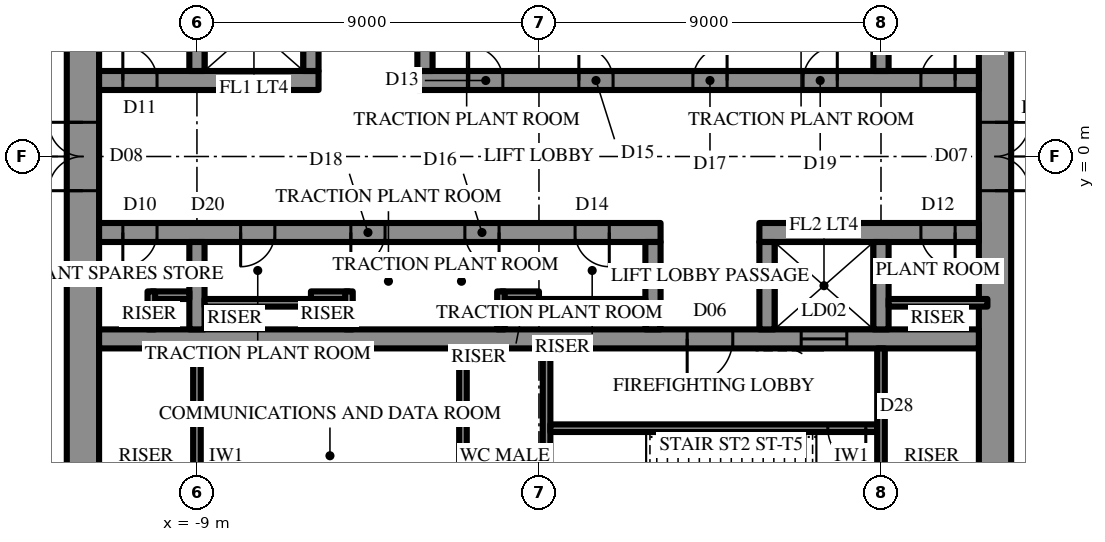
"""IFC4 building model, lengths in metres.
Left out: names, types, materials, properties, quantities, classifications, styles, units other than length and angle.
Written with IfcOpenShell. Run it as: python <this file> out.ifc"""

import sys

from ifc_helpers import new_model, si_unit, direction, frame, frame_2d, origin, place, context, subcontext, project, spatial, rectangle, extrude, element, fill, save


model = new_model("IFC4")
c1 = context("Model", 3, precision=1e-05, world=origin(), true_north=direction((0.0, 1.0)))
c2 = subcontext(c1, "Body", "Model", "MODEL_VIEW")
j1 = project(units=[si_unit("LENGTHUNIT", "METRE"), si_unit("PLANEANGLEUNIT", "RADIAN")], contexts=[c1])
p1 = place(None, origin())
s1 = spatial("IfcSite", under=j1, at=p1, CompositionType="ELEMENT")
p2 = place(p1, origin())
s2 = spatial("IfcBuilding", under=s1, at=p2, CompositionType="ELEMENT")
p3 = place(p2, frame((0.0, 0.0, 396.3)))
s3 = spatial("IfcBuildingStorey", under=s2, at=p3, CompositionType="ELEMENT", Elevation=396.3)
p4 = place(p3, frame((12.0, -10.7, 0.0), z_axis=(0.0, 0.0, 1.0), x_axis=(0.0, 1.0, 0.0)))
e1 = element("IfcWall", 1, at=p4, inside=s3, PredefinedType="SHEAR", context=c2, shape_type="SweptSolid", body=[
    extrude(rectangle(XDim=21.4, YDim=0.85, at=frame_2d((10.7, 0.0))), origin(), (0.0, 0.0, 1.0), 6.0),
])
p5 = place(p4, frame((9.8, 0.0, 0.0)))
e2 = element("IfcOpeningElement", 2, at=p5, cuts=e1, PredefinedType="OPENING", context=c2, shape_type="SweptSolid", body=[
    extrude(rectangle(XDim=1.8, YDim=2.4, at=frame_2d((0.9, 1.2))), frame((0.0, 0.435, 0.0), z_axis=(0.0, -1.0, 0.0), x_axis=(1.0, 0.0, 0.0)), (0.0, 0.0, 1.0), 0.87),
])
p6 = place(p3, frame((-12.0, 10.7, 0.0), z_axis=(0.0, 0.0, 1.0), x_axis=(0.0, -1.0, 0.0)))
e3 = element("IfcWall", 3, at=p6, inside=s3, PredefinedType="SHEAR", context=c2, shape_type="SweptSolid", body=[
    extrude(rectangle(XDim=21.4, YDim=0.85, at=frame_2d((10.7, 0.0))), origin(), (0.0, 0.0, 1.0), 6.0),
])
p7 = place(p6, frame((9.8, 0.0, 0.0)))
e4 = element("IfcOpeningElement", 4, at=p7, cuts=e3, PredefinedType="OPENING", context=c2, shape_type="SweptSolid", body=[
    extrude(rectangle(XDim=1.8, YDim=2.4, at=frame_2d((0.9, 1.2))), frame((0.0, 0.435, 0.0), z_axis=(0.0, -1.0, 0.0), x_axis=(1.0, 0.0, 0.0)), (0.0, 0.0, 1.0), 0.87),
])
p8 = place(p3, frame((-11.575, 2.0, 0.0), z_axis=(0.0, 0.0, 1.0), x_axis=(1.0, 0.0, 0.0)))
e5 = element("IfcWall", 5, at=p8, inside=s3, PredefinedType="SHEAR", context=c2, shape_type="SweptSolid", body=[
    extrude(rectangle(XDim=5.775, YDim=0.5, at=frame_2d((2.887, 0.0))), origin(), (0.0, 0.0, 1.0), 6.0),
])
p9 = place(p8, frame((0.625, 0.0, 0.0)))
e6 = element("IfcOpeningElement", 6, at=p9, cuts=e5, PredefinedType="OPENING", context=c2, shape_type="SweptSolid", body=[
    extrude(rectangle(XDim=0.9, YDim=2.2, at=frame_2d((0.45, 1.1))), frame((0.0, 0.26, 0.0), z_axis=(0.0, -1.0, 0.0), x_axis=(1.0, 0.0, 0.0)), (0.0, 0.0, 1.0), 0.52),
])
p10 = place(p3, frame((-3.2, 2.0, 0.0), z_axis=(0.0, 0.0, 1.0), x_axis=(1.0, 0.0, 0.0)))
e7 = element("IfcWall", 7, at=p10, inside=s3, PredefinedType="SHEAR", context=c2, shape_type="SweptSolid", body=[
    extrude(rectangle(XDim=14.775, YDim=0.5, at=frame_2d((7.387, 0.0))), origin(), (0.0, 0.0, 1.0), 6.0),
])
p11 = place(p10, frame((1.35, 0.0, 0.0)))
e8 = element("IfcOpeningElement", 8, at=p11, cuts=e7, PredefinedType="OPENING", context=c2, shape_type="SweptSolid", body=[
    extrude(rectangle(XDim=0.9, YDim=2.2, at=frame_2d((0.45, 1.1))), frame((0.0, 0.26, 0.0), z_axis=(0.0, -1.0, 0.0), x_axis=(1.0, 0.0, 0.0)), (0.0, 0.0, 1.0), 0.52),
])
p12 = place(p10, frame((4.25, 0.0, 0.0)))
e9 = element("IfcOpeningElement", 9, at=p12, cuts=e7, PredefinedType="OPENING", context=c2, shape_type="SweptSolid", body=[
    extrude(rectangle(XDim=0.9, YDim=2.2, at=frame_2d((0.45, 1.1))), frame((0.0, 0.26, 0.0), z_axis=(0.0, -1.0, 0.0), x_axis=(1.0, 0.0, 0.0)), (0.0, 0.0, 1.0), 0.52),
])
p13 = place(p10, frame((7.25, 0.0, 0.0)))
e10 = element("IfcOpeningElement", 10, at=p13, cuts=e7, PredefinedType="OPENING", context=c2, shape_type="SweptSolid", body=[
    extrude(rectangle(XDim=0.9, YDim=2.2, at=frame_2d((0.45, 1.1))), frame((0.0, 0.26, 0.0), z_axis=(0.0, -1.0, 0.0), x_axis=(1.0, 0.0, 0.0)), (0.0, 0.0, 1.0), 0.52),
])
p14 = place(p10, frame((10.15, 0.0, 0.0)))
e11 = element("IfcOpeningElement", 11, at=p14, cuts=e7, PredefinedType="OPENING", context=c2, shape_type="SweptSolid", body=[
    extrude(rectangle(XDim=0.9, YDim=2.2, at=frame_2d((0.45, 1.1))), frame((0.0, 0.26, 0.0), z_axis=(0.0, -1.0, 0.0), x_axis=(1.0, 0.0, 0.0)), (0.0, 0.0, 1.0), 0.52),
])
p15 = place(p10, frame((13.25, 0.0, 0.0)))
e12 = element("IfcOpeningElement", 12, at=p15, cuts=e7, PredefinedType="OPENING", context=c2, shape_type="SweptSolid", body=[
    extrude(rectangle(XDim=0.9, YDim=2.2, at=frame_2d((0.45, 1.1))), frame((0.0, 0.26, 0.0), z_axis=(0.0, -1.0, 0.0), x_axis=(1.0, 0.0, 0.0)), (0.0, 0.0, 1.0), 0.52),
])
for number, where, z_axis, x_axis in (
    (13, (-9.0, 2.25, 0.0), (0.0, 0.0, 1.0), (0.0, 1.0, 0.0)),
    (14, (-6.0, 2.25, 0.0), (0.0, 0.0, 1.0), (0.0, 1.0, 0.0)),
    (15, (-3.0, 2.25, 0.0), (0.0, 0.0, 1.0), (0.0, 1.0, 0.0)),
    (16, (9.0, 2.25, 0.0), (0.0, 0.0, 1.0), (0.0, 1.0, 0.0)),
):
    element("IfcWall", number, at=place(p3, frame(where, z_axis=z_axis, x_axis=x_axis)), inside=s3, PredefinedType="SHEAR", context=c2, shape_type="SweptSolid", body=[
        extrude(rectangle(XDim=2.3, YDim=0.4, at=frame_2d((1.15, 0.0))), origin(), (0.0, 0.0, 1.0), 6.0),
    ])
p16 = place(p3, frame((11.575, -2.0, 0.0), z_axis=(0.0, 0.0, 1.0), x_axis=(-1.0, 0.0, 0.0)))
e17 = element("IfcWall", 17, at=p16, inside=s3, PredefinedType="SHEAR", context=c2, shape_type="SweptSolid", body=[
    extrude(rectangle(XDim=5.775, YDim=0.5, at=frame_2d((2.887, 0.0))), origin(), (0.0, 0.0, 1.0), 6.0),
])
p17 = place(p16, frame((0.625, 0.0, 0.0)))
e18 = element("IfcOpeningElement", 18, at=p17, cuts=e17, PredefinedType="OPENING", context=c2, shape_type="SweptSolid", body=[
    extrude(rectangle(XDim=0.9, YDim=2.2, at=frame_2d((0.45, 1.1))), frame((0.0, 0.26, 0.0), z_axis=(0.0, -1.0, 0.0), x_axis=(1.0, 0.0, 0.0)), (0.0, 0.0, 1.0), 0.52),
])
p18 = place(p3, frame((3.2, -2.0, 0.0), z_axis=(0.0, 0.0, 1.0), x_axis=(-1.0, 0.0, 0.0)))
e19 = element("IfcWall", 19, at=p18, inside=s3, PredefinedType="SHEAR", context=c2, shape_type="SweptSolid", body=[
    extrude(rectangle(XDim=14.775, YDim=0.5, at=frame_2d((7.387, 0.0))), origin(), (0.0, 0.0, 1.0), 6.0),
])
p19 = place(p18, frame((1.35, 0.0, 0.0)))
e20 = element("IfcOpeningElement", 20, at=p19, cuts=e19, PredefinedType="OPENING", context=c2, shape_type="SweptSolid", body=[
    extrude(rectangle(XDim=0.9, YDim=2.2, at=frame_2d((0.45, 1.1))), frame((0.0, 0.26, 0.0), z_axis=(0.0, -1.0, 0.0), x_axis=(1.0, 0.0, 0.0)), (0.0, 0.0, 1.0), 0.52),
])
p20 = place(p18, frame((4.25, 0.0, 0.0)))
e21 = element("IfcOpeningElement", 21, at=p20, cuts=e19, PredefinedType="OPENING", context=c2, shape_type="SweptSolid", body=[
    extrude(rectangle(XDim=0.9, YDim=2.2, at=frame_2d((0.45, 1.1))), frame((0.0, 0.26, 0.0), z_axis=(0.0, -1.0, 0.0), x_axis=(1.0, 0.0, 0.0)), (0.0, 0.0, 1.0), 0.52),
])
p21 = place(p18, frame((7.25, 0.0, 0.0)))
e22 = element("IfcOpeningElement", 22, at=p21, cuts=e19, PredefinedType="OPENING", context=c2, shape_type="SweptSolid", body=[
    extrude(rectangle(XDim=0.9, YDim=2.2, at=frame_2d((0.45, 1.1))), frame((0.0, 0.26, 0.0), z_axis=(0.0, -1.0, 0.0), x_axis=(1.0, 0.0, 0.0)), (0.0, 0.0, 1.0), 0.52),
])
p22 = place(p18, frame((10.15, 0.0, 0.0)))
e23 = element("IfcOpeningElement", 23, at=p22, cuts=e19, PredefinedType="OPENING", context=c2, shape_type="SweptSolid", body=[
    extrude(rectangle(XDim=0.9, YDim=2.2, at=frame_2d((0.45, 1.1))), frame((0.0, 0.26, 0.0), z_axis=(0.0, -1.0, 0.0), x_axis=(1.0, 0.0, 0.0)), (0.0, 0.0, 1.0), 0.52),
])
p23 = place(p18, frame((13.25, 0.0, 0.0)))
e24 = element("IfcOpeningElement", 24, at=p23, cuts=e19, PredefinedType="OPENING", context=c2, shape_type="SweptSolid", body=[
    extrude(rectangle(XDim=0.9, YDim=2.2, at=frame_2d((0.45, 1.1))), frame((0.0, 0.26, 0.0), z_axis=(0.0, -1.0, 0.0), x_axis=(1.0, 0.0, 0.0)), (0.0, 0.0, 1.0), 0.52),
])
p24 = place(p3, frame((11.575, -4.8, 0.0), z_axis=(0.0, 0.0, 1.0), x_axis=(-1.0, 0.0, 0.0)))
e25 = element("IfcWall", 25, at=p24, inside=s3, PredefinedType="SHEAR", context=c2, shape_type="SweptSolid", body=[
    extrude(rectangle(XDim=23.15, YDim=0.5, at=frame_2d((11.575, 0.0))), origin(), (0.0, 0.0, 1.0), 6.0),
])
p25 = place(p24, frame((6.475, 0.0, 0.0)))
e26 = element("IfcOpeningElement", 26, at=p25, cuts=e25, PredefinedType="OPENING", context=c2, shape_type="SweptSolid", body=[
    extrude(rectangle(XDim=1.2, YDim=2.2, at=frame_2d((0.6, 1.1))), frame((0.0, 0.26, 0.0), z_axis=(0.0, -1.0, 0.0), x_axis=(1.0, 0.0, 0.0)), (0.0, 0.0, 1.0), 0.52),
])
p26 = place(p24, frame((3.475, 0.0, 0.0)))
e27 = element("IfcOpeningElement", 27, at=p26, cuts=e25, PredefinedType="OPENING", context=c2, shape_type="SweptSolid", body=[
    extrude(rectangle(XDim=1.2, YDim=2.2, at=frame_2d((0.6, 1.1))), frame((0.0, 0.26, 0.0), z_axis=(0.0, -1.0, 0.0), x_axis=(1.0, 0.0, 0.0)), (0.0, 0.0, 1.0), 0.52),
])
for number, where, z_axis, x_axis in (
    (28, (9.0, -2.25, 0.0), (0.0, 0.0, 1.0), (0.0, -1.0, 0.0)),
    (29, (6.0, -2.25, 0.0), (0.0, 0.0, 1.0), (0.0, -1.0, 0.0)),
    (30, (3.0, -2.25, 0.0), (0.0, 0.0, 1.0), (0.0, -1.0, 0.0)),
    (31, (-9.0, -2.25, 0.0), (0.0, 0.0, 1.0), (0.0, -1.0, 0.0)),
):
    element("IfcWall", number, at=place(p3, frame(where, z_axis=z_axis, x_axis=x_axis)), inside=s3, PredefinedType="SHEAR", context=c2, shape_type="SweptSolid", body=[
        extrude(rectangle(XDim=2.3, YDim=0.4, at=frame_2d((1.15, 0.0))), origin(), (0.0, 0.0, 1.0), 6.0),
    ])
p27 = place(p3, frame((0.2, -5.05, 0.0), z_axis=(0.0, 0.0, 1.0), x_axis=(0.0, -1.0, 0.0)))
e32 = element("IfcWall", 32, at=p27, inside=s3, PredefinedType="SHEAR", context=c2, shape_type="SweptSolid", body=[
    extrude(rectangle(XDim=5.65, YDim=0.2, at=frame_2d((2.825, 0.0))), origin(), (0.0, 0.0, 1.0), 6.0),
])
p28 = place(p3, frame((8.9, -7.15, 0.0), z_axis=(0.0, 0.0, 1.0), x_axis=(-1.0, 0.0, 0.0)))
e33 = element("IfcWall", 33, at=p28, inside=s3, PredefinedType="SHEAR", context=c2, shape_type="SweptSolid", body=[
    extrude(rectangle(XDim=8.6, YDim=0.2, at=frame_2d((4.3, 0.0))), origin(), (0.0, 0.0, 1.0), 6.0),
])
p29 = place(p28, frame((0.3, 0.0, 0.0)))
e34 = element("IfcOpeningElement", 34, at=p29, cuts=e33, PredefinedType="OPENING", context=c2, shape_type="SweptSolid", body=[
    extrude(rectangle(XDim=1.0, YDim=2.2, at=frame_2d((0.5, 1.1))), frame((0.0, 0.11, 0.0), z_axis=(0.0, -1.0, 0.0), x_axis=(1.0, 0.0, 0.0)), (0.0, 0.0, 1.0), 0.22),
])
for number, where, z_axis, x_axis in (
    (35, (9.0, -5.05, 0.0), (0.0, 0.0, 1.0), (0.0, -1.0, 0.0)),
    (36, (-9.0, -5.05, 0.0), (0.0, 0.0, 1.0), (0.0, -1.0, 0.0)),
    (37, (-2.0, -5.05, 0.0), (0.0, 0.0, 1.0), (0.0, -1.0, 0.0)),
):
    element("IfcWall", number, at=place(p3, frame(where, z_axis=z_axis, x_axis=x_axis)), inside=s3, PredefinedType="PARTITIONING", context=c2, shape_type="SweptSolid", body=[
        extrude(rectangle(XDim=5.65, YDim=0.2, at=frame_2d((2.825, 0.0))), origin(), (0.0, 0.0, 1.0), 5.8),
    ])
p30 = place(p3, frame((11.8, -3.85, 0.0), z_axis=(0.0, 0.0, 1.0), x_axis=(-1.0, 0.0, 0.0)))
e38 = element("IfcWall", 38, at=p30, inside=s3, PredefinedType="PARTITIONING", context=c2, shape_type="SweptSolid", body=[
    extrude(rectangle(XDim=2.6, YDim=0.2, at=frame_2d((1.3, 0.0))), origin(), (0.0, 0.0, 1.0), 5.8),
])
p31 = place(p3, frame((2.8, -3.85, 0.0), z_axis=(0.0, 0.0, 1.0), x_axis=(-1.0, 0.0, 0.0)))
e39 = element("IfcWall", 39, at=p31, inside=s3, PredefinedType="PARTITIONING", context=c2, shape_type="SweptSolid", body=[
    extrude(rectangle(XDim=2.8, YDim=0.2, at=frame_2d((1.4, 0.0))), origin(), (0.0, 0.0, 1.0), 5.8),
])
for number, where, z_axis, x_axis in (
    (40, (0.0, -3.65, 0.0), (0.0, 0.0, 1.0), (-1.0, 0.0, 0.0)),
    (41, (-1.0, -3.55, 0.0), (0.0, 0.0, 1.0), (0.0, -1.0, 0.0)),
    (42, (-5.0, -3.65, 0.0), (0.0, 0.0, 1.0), (-1.0, 0.0, 0.0)),
    (43, (-5.0, -3.55, 0.0), (0.0, 0.0, 1.0), (0.0, -1.0, 0.0)),
):
    element("IfcWall", number, at=place(p3, frame(where, z_axis=z_axis, x_axis=x_axis)), inside=s3, PredefinedType="PARTITIONING", context=c2, shape_type="SweptSolid", body=[
        extrude(rectangle(XDim=1.0, YDim=0.2, at=frame_2d((0.5, 0.0))), origin(), (0.0, 0.0, 1.0), 5.8),
    ])
p32 = place(p3, frame((-6.0, -3.85, 0.0), z_axis=(0.0, 0.0, 1.0), x_axis=(-1.0, 0.0, 0.0)))
e44 = element("IfcWall", 44, at=p32, inside=s3, PredefinedType="PARTITIONING", context=c2, shape_type="SweptSolid", body=[
    extrude(rectangle(XDim=2.8, YDim=0.2, at=frame_2d((1.4, 0.0))), origin(), (0.0, 0.0, 1.0), 5.8),
])
for number, where, z_axis, x_axis in (
    (45, (-9.2, -3.65, 0.0), (0.0, 0.0, 1.0), (-1.0, 0.0, 0.0)),
    (46, (-10.2, -3.55, 0.0), (0.0, 0.0, 1.0), (0.0, -1.0, 0.0)),
):
    element("IfcWall", number, at=place(p3, frame(where, z_axis=z_axis, x_axis=x_axis)), inside=s3, PredefinedType="PARTITIONING", context=c2, shape_type="SweptSolid", body=[
        extrude(rectangle(XDim=1.0, YDim=0.2, at=frame_2d((0.5, 0.0))), origin(), (0.0, 0.0, 1.0), 5.8),
    ])
p33 = place(p5, frame((1.8, 0.0, 0.0), z_axis=(0.0, 0.0, 1.0), x_axis=(-1.0, 0.0, 0.0)))
e47 = element("IfcDoor", 47, at=p33, inside=s3, OperationType="DOUBLE_DOOR_SINGLE_SWING", PredefinedType="DOOR", context=c2, shape_type="SweptSolid", body=[
    extrude(rectangle(XDim=1.8, YDim=2.4, at=frame_2d((0.9, 1.2))), frame((0.0, 0.025, 0.0), z_axis=(0.0, -1.0, 0.0), x_axis=(1.0, 0.0, 0.0)), (0.0, 0.0, 1.0), 0.05),
])
fill(e2, e47)
p34 = place(p7, frame((1.8, 0.0, 0.0), z_axis=(0.0, 0.0, 1.0), x_axis=(-1.0, 0.0, 0.0)))
e48 = element("IfcDoor", 48, at=p34, inside=s3, OperationType="DOUBLE_DOOR_SINGLE_SWING", PredefinedType="DOOR", context=c2, shape_type="SweptSolid", body=[
    extrude(rectangle(XDim=1.8, YDim=2.4, at=frame_2d((0.9, 1.2))), frame((0.0, 0.025, 0.0), z_axis=(0.0, -1.0, 0.0), x_axis=(1.0, 0.0, 0.0)), (0.0, 0.0, 1.0), 0.05),
])
fill(e4, e48)
p35 = place(p25, origin())
e49 = element("IfcDoor", 49, at=p35, inside=s3, OperationType="SINGLE_SWING_LEFT", PredefinedType="DOOR", context=c2, shape_type="SweptSolid", body=[
    extrude(rectangle(XDim=1.2, YDim=2.2, at=frame_2d((0.6, 1.1))), frame((0.0, 0.025, 0.0), z_axis=(0.0, -1.0, 0.0), x_axis=(1.0, 0.0, 0.0)), (0.0, 0.0, 1.0), 0.05),
])
fill(e26, e49)
p36 = place(p29, origin())
e50 = element("IfcDoor", 50, at=p36, inside=s3, OperationType="SINGLE_SWING_RIGHT", PredefinedType="DOOR", context=c2, shape_type="SweptSolid", body=[
    extrude(rectangle(XDim=1.0, YDim=2.2, at=frame_2d((0.5, 1.1))), frame((0.0, 0.025, 0.0), z_axis=(0.0, -1.0, 0.0), x_axis=(1.0, 0.0, 0.0)), (0.0, 0.0, 1.0), 0.05),
])
fill(e34, e50)
p37 = place(p9, origin())
e51 = element("IfcDoor", 51, at=p37, inside=s3, OperationType="SINGLE_SWING_RIGHT", PredefinedType="DOOR", context=c2, shape_type="SweptSolid", body=[
    extrude(rectangle(XDim=0.9, YDim=2.2, at=frame_2d((0.45, 1.1))), frame((0.0, 0.025, 0.0), z_axis=(0.0, -1.0, 0.0), x_axis=(1.0, 0.0, 0.0)), (0.0, 0.0, 1.0), 0.05),
])
fill(e6, e51)
p38 = place(p11, origin())
e52 = element("IfcDoor", 52, at=p38, inside=s3, OperationType="SINGLE_SWING_RIGHT", PredefinedType="DOOR", context=c2, shape_type="SweptSolid", body=[
    extrude(rectangle(XDim=0.9, YDim=2.2, at=frame_2d((0.45, 1.1))), frame((0.0, 0.025, 0.0), z_axis=(0.0, -1.0, 0.0), x_axis=(1.0, 0.0, 0.0)), (0.0, 0.0, 1.0), 0.05),
])
fill(e8, e52)
p39 = place(p12, origin())
e53 = element("IfcDoor", 53, at=p39, inside=s3, OperationType="SINGLE_SWING_RIGHT", PredefinedType="DOOR", context=c2, shape_type="SweptSolid", body=[
    extrude(rectangle(XDim=0.9, YDim=2.2, at=frame_2d((0.45, 1.1))), frame((0.0, 0.025, 0.0), z_axis=(0.0, -1.0, 0.0), x_axis=(1.0, 0.0, 0.0)), (0.0, 0.0, 1.0), 0.05),
])
fill(e9, e53)
p40 = place(p13, origin())
e54 = element("IfcDoor", 54, at=p40, inside=s3, OperationType="SINGLE_SWING_LEFT", PredefinedType="DOOR", context=c2, shape_type="SweptSolid", body=[
    extrude(rectangle(XDim=0.9, YDim=2.2, at=frame_2d((0.45, 1.1))), frame((0.0, 0.025, 0.0), z_axis=(0.0, -1.0, 0.0), x_axis=(1.0, 0.0, 0.0)), (0.0, 0.0, 1.0), 0.05),
])
fill(e10, e54)
p41 = place(p14, origin())
e55 = element("IfcDoor", 55, at=p41, inside=s3, OperationType="SINGLE_SWING_LEFT", PredefinedType="DOOR", context=c2, shape_type="SweptSolid", body=[
    extrude(rectangle(XDim=0.9, YDim=2.2, at=frame_2d((0.45, 1.1))), frame((0.0, 0.025, 0.0), z_axis=(0.0, -1.0, 0.0), x_axis=(1.0, 0.0, 0.0)), (0.0, 0.0, 1.0), 0.05),
])
fill(e11, e55)
p42 = place(p15, origin())
e56 = element("IfcDoor", 56, at=p42, inside=s3, OperationType="SINGLE_SWING_LEFT", PredefinedType="DOOR", context=c2, shape_type="SweptSolid", body=[
    extrude(rectangle(XDim=0.9, YDim=2.2, at=frame_2d((0.45, 1.1))), frame((0.0, 0.025, 0.0), z_axis=(0.0, -1.0, 0.0), x_axis=(1.0, 0.0, 0.0)), (0.0, 0.0, 1.0), 0.05),
])
fill(e12, e56)
p43 = place(p17, origin())
e57 = element("IfcDoor", 57, at=p43, inside=s3, OperationType="SINGLE_SWING_RIGHT", PredefinedType="DOOR", context=c2, shape_type="SweptSolid", body=[
    extrude(rectangle(XDim=0.9, YDim=2.2, at=frame_2d((0.45, 1.1))), frame((0.0, 0.025, 0.0), z_axis=(0.0, -1.0, 0.0), x_axis=(1.0, 0.0, 0.0)), (0.0, 0.0, 1.0), 0.05),
])
fill(e18, e57)
p44 = place(p19, origin())
e58 = element("IfcDoor", 58, at=p44, inside=s3, OperationType="SINGLE_SWING_RIGHT", PredefinedType="DOOR", context=c2, shape_type="SweptSolid", body=[
    extrude(rectangle(XDim=0.9, YDim=2.2, at=frame_2d((0.45, 1.1))), frame((0.0, 0.025, 0.0), z_axis=(0.0, -1.0, 0.0), x_axis=(1.0, 0.0, 0.0)), (0.0, 0.0, 1.0), 0.05),
])
fill(e20, e58)
p45 = place(p20, origin())
e59 = element("IfcDoor", 59, at=p45, inside=s3, OperationType="SINGLE_SWING_RIGHT", PredefinedType="DOOR", context=c2, shape_type="SweptSolid", body=[
    extrude(rectangle(XDim=0.9, YDim=2.2, at=frame_2d((0.45, 1.1))), frame((0.0, 0.025, 0.0), z_axis=(0.0, -1.0, 0.0), x_axis=(1.0, 0.0, 0.0)), (0.0, 0.0, 1.0), 0.05),
])
fill(e21, e59)
p46 = place(p21, origin())
e60 = element("IfcDoor", 60, at=p46, inside=s3, OperationType="SINGLE_SWING_LEFT", PredefinedType="DOOR", context=c2, shape_type="SweptSolid", body=[
    extrude(rectangle(XDim=0.9, YDim=2.2, at=frame_2d((0.45, 1.1))), frame((0.0, 0.025, 0.0), z_axis=(0.0, -1.0, 0.0), x_axis=(1.0, 0.0, 0.0)), (0.0, 0.0, 1.0), 0.05),
])
fill(e22, e60)
p47 = place(p22, origin())
e61 = element("IfcDoor", 61, at=p47, inside=s3, OperationType="SINGLE_SWING_LEFT", PredefinedType="DOOR", context=c2, shape_type="SweptSolid", body=[
    extrude(rectangle(XDim=0.9, YDim=2.2, at=frame_2d((0.45, 1.1))), frame((0.0, 0.025, 0.0), z_axis=(0.0, -1.0, 0.0), x_axis=(1.0, 0.0, 0.0)), (0.0, 0.0, 1.0), 0.05),
])
fill(e23, e61)
p48 = place(p23, origin())
e62 = element("IfcDoor", 62, at=p48, inside=s3, OperationType="SINGLE_SWING_LEFT", PredefinedType="DOOR", context=c2, shape_type="SweptSolid", body=[
    extrude(rectangle(XDim=0.9, YDim=2.2, at=frame_2d((0.45, 1.1))), frame((0.0, 0.025, 0.0), z_axis=(0.0, -1.0, 0.0), x_axis=(1.0, 0.0, 0.0)), (0.0, 0.0, 1.0), 0.05),
])
fill(e24, e62)
p49 = place(p26, origin())
e63 = element("IfcDoor", 63, at=p49, inside=s3, OperationType="SLIDING_TO_LEFT", PredefinedType="DOOR", context=c2, shape_type="SweptSolid", body=[
    extrude(rectangle(XDim=1.2, YDim=2.2, at=frame_2d((0.6, 1.1))), frame((0.0, 0.025, 0.0), z_axis=(0.0, -1.0, 0.0), x_axis=(1.0, 0.0, 0.0)), (0.0, 0.0, 1.0), 0.05),
])
fill(e27, e63)
save(model, sys.argv[1])
